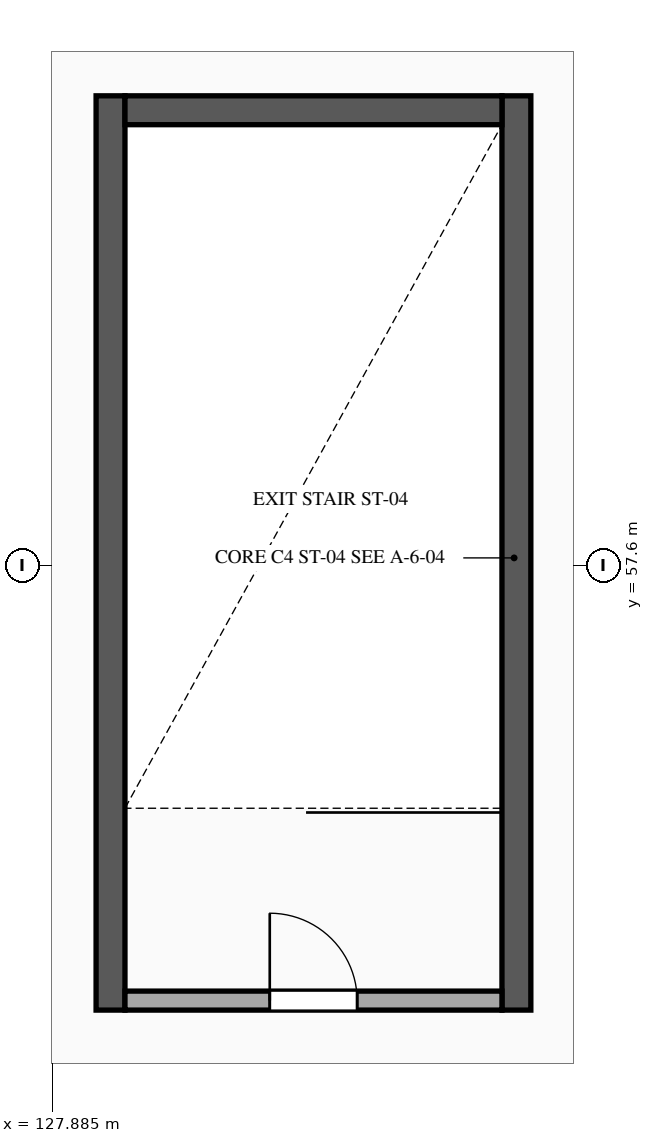
"""IFC4 building model, lengths in metres.
Left out: names, types, materials, properties, quantities, classifications, styles, units other than length and angle.
Written with IfcOpenShell. Run it as: python <this file> out.ifc"""

import sys

from ifc_helpers import new_model, si_unit, direction, frame, frame_2d, origin, place, context, subcontext, project, spatial, rectangle, extrude, element, fill, save


model = new_model("IFC4")
c1 = context("Model", 3, precision=1e-05, world=origin(), true_north=direction((0.0, 1.0)))
c2 = subcontext(c1, "Body", "Model", "MODEL_VIEW")
j1 = project(units=[si_unit("LENGTHUNIT", "METRE"), si_unit("PLANEANGLEUNIT", "RADIAN")], contexts=[c1])
p1 = place(None, origin())
s1 = spatial("IfcSite", under=j1, at=p1, CompositionType="ELEMENT")
p2 = place(p1, origin())
s2 = spatial("IfcBuilding", under=s1, at=p2, CompositionType="ELEMENT")
p3 = place(p2, frame((0.0, 0.0, 15.3)))
s3 = spatial("IfcBuildingStorey", under=s2, at=p3, CompositionType="ELEMENT", Elevation=15.3)
for number, where, z_axis, x_axis in (
    (1, (128.65, 51.75, 0.0), (0.0, 0.0, 1.0), (0.0, 1.0, 0.0)),
    (2, (133.99, 63.78, 0.0), (0.0, 0.0, 1.0), (0.0, -1.0, 0.0)),
):
    element("IfcWall", number, at=place(p3, frame(where, z_axis=z_axis, x_axis=x_axis)), inside=s3, PredefinedType="SHEAR", context=c2, shape_type="SweptSolid", body=[
        extrude(rectangle(XDim=12.03, YDim=0.38, at=frame_2d((6.015, 0.0))), origin(), (0.0, 0.0, 1.0), 4.26),
    ])
p4 = place(p3, frame((128.84, 63.59, 0.0), z_axis=(0.0, 0.0, 1.0), x_axis=(1.0, 0.0, 0.0)))
e3 = element("IfcWall", 3, at=p4, inside=s3, PredefinedType="SHEAR", context=c2, shape_type="SweptSolid", body=[
    extrude(rectangle(XDim=4.96, YDim=0.38, at=frame_2d((2.48, 0.0))), origin(), (0.0, 0.0, 1.0), 4.26),
])
p5 = place(p3, frame((128.84, 51.875, 0.0), z_axis=(0.0, 0.0, 1.0), x_axis=(1.0, 0.0, 0.0)))
e4 = element("IfcWall", 4, at=p5, inside=s3, PredefinedType="STANDARD", context=c2, shape_type="SweptSolid", body=[
    extrude(rectangle(XDim=4.96, YDim=0.25, at=frame_2d((2.48, 0.0))), origin(), (0.0, 0.0, 1.0), 4.25),
])
p6 = place(p5, frame((1.905, 0.0, 0.0)))
e5 = element("IfcOpeningElement", 5, at=p6, cuts=e4, PredefinedType="OPENING", context=c2, shape_type="SweptSolid", body=[
    extrude(rectangle(XDim=1.15, YDim=2.2, at=frame_2d((0.575, 1.1))), frame((0.0, 0.135, 0.0), z_axis=(0.0, -1.0, 0.0), x_axis=(1.0, 0.0, 0.0)), (0.0, 0.0, 1.0), 0.27),
])
p7 = place(p6, origin())
e6 = element("IfcDoor", 6, at=p7, inside=s3, OperationType="SINGLE_SWING_LEFT", PredefinedType="DOOR", context=c2, shape_type="SweptSolid", body=[
    extrude(rectangle(XDim=1.15, YDim=2.2, at=frame_2d((0.575, 1.1))), frame((0.0, 0.025, 0.0), z_axis=(0.0, -1.0, 0.0), x_axis=(1.0, 0.0, 0.0)), (0.0, 0.0, 1.0), 0.05),
])
fill(e5, e6)
save(model, sys.argv[1])
